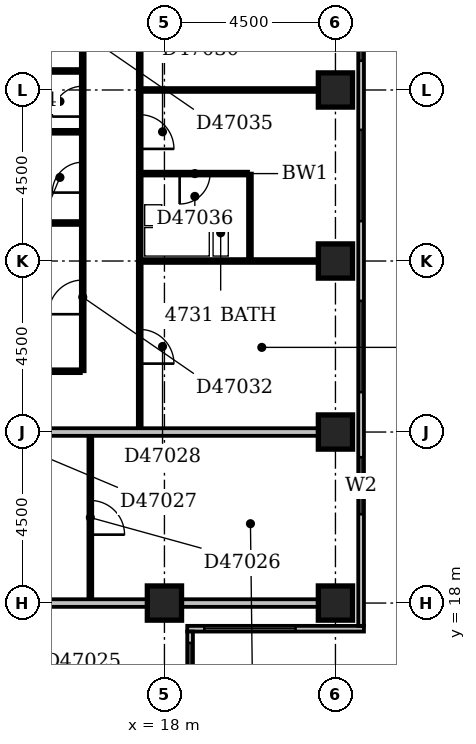
"""IFC4 building model, lengths in metres.
Left out: names, types, materials, properties, quantities, classifications, styles, units other than length and angle.
Written with IfcOpenShell. Run it as: python <this file> out.ifc"""

import sys

from ifc_helpers import new_model, si_unit, direction, frame, frame_2d, origin, origin_2d, place, context, subcontext, project, spatial, rectangle, extrude, element, fill, save


model = new_model("IFC4")
c1 = context("Model", 3, precision=1e-05, world=origin(), true_north=direction((0.0, 1.0)))
c2 = subcontext(c1, "Body", "Model", "MODEL_VIEW")
j1 = project(units=[si_unit("LENGTHUNIT", "METRE"), si_unit("PLANEANGLEUNIT", "RADIAN")], contexts=[c1])
p1 = place(None, origin())
s1 = spatial("IfcSite", under=j1, at=p1, CompositionType="ELEMENT")
p2 = place(p1, origin())
s2 = spatial("IfcBuilding", under=s1, at=p2, CompositionType="ELEMENT")
p3 = place(p2, frame((0.0, 0.0, 186.2)))
s3 = spatial("IfcBuildingStorey", under=s2, at=p3, CompositionType="ELEMENT", Elevation=186.2)
for number, where, z_axis, x_axis in (
    (1, (18.0, 18.0, -0.35), (0.0, 0.0, 1.0), (1.0, 0.0, 0.0)),
    (2, (22.5, 18.0, -0.35), (0.0, 0.0, 1.0), (1.0, 0.0, 0.0)),
    (3, (22.5, 22.5, -0.35), (0.0, 0.0, 1.0), (1.0, 0.0, 0.0)),
    (4, (22.5, 27.0, -0.35), (0.0, 0.0, 1.0), (1.0, 0.0, 0.0)),
    (5, (22.5, 31.5, -0.35), (0.0, 0.0, 1.0), (1.0, 0.0, 0.0)),
):
    element("IfcColumn", number, at=place(p3, frame(where, z_axis=z_axis, x_axis=x_axis)), inside=s3, PredefinedType="COLUMN", context=c2, shape_type="SweptSolid", body=[
        extrude(rectangle(XDim=0.9, YDim=0.9, at=origin_2d()), origin(), (0.0, 0.0, 1.0), 3.65),
    ])
p4 = place(p3, frame((18.675, 8.4, 0.0), z_axis=(0.0, 0.0, 1.0), x_axis=(0.0, 1.0, 0.0)))
e6 = element("IfcWall", 6, at=p4, inside=s3, PredefinedType="STANDARD", context=c2, shape_type="SweptSolid", body=[
    extrude(rectangle(XDim=8.85, YDim=0.15, at=frame_2d((4.425, 0.0))), origin(), (0.0, 0.0, 1.0), 2.7),
])
p5 = place(p4, frame((1.935, 0.0, 0.6)))
e7 = element("IfcOpeningElement", 7, at=p5, cuts=e6, PredefinedType="OPENING", context=c2, shape_type="SweptSolid", body=[
    extrude(rectangle(XDim=2.4, YDim=1.8, at=frame_2d((1.2, 0.9))), frame((0.0, 0.087, 0.0), z_axis=(0.0, -1.0, 0.0), x_axis=(1.0, 0.0, 0.0)), (0.0, 0.0, 1.0), 0.174),
])
p6 = place(p4, frame((6.15, 0.0, 0.6)))
e8 = element("IfcOpeningElement", 8, at=p6, cuts=e6, PredefinedType="OPENING", context=c2, shape_type="SweptSolid", body=[
    extrude(rectangle(XDim=2.4, YDim=1.8, at=frame_2d((1.2, 0.9))), frame((0.0, 0.087, 0.0), z_axis=(0.0, -1.0, 0.0), x_axis=(1.0, 0.0, 0.0)), (0.0, 0.0, 1.0), 0.174),
])
p7 = place(p3, frame((18.6, 17.325, 0.0), z_axis=(0.0, 0.0, 1.0), x_axis=(1.0, 0.0, 0.0)))
e9 = element("IfcWall", 9, at=p7, inside=s3, PredefinedType="STANDARD", context=c2, shape_type="SweptSolid", body=[
    extrude(rectangle(XDim=4.65, YDim=0.15, at=frame_2d((2.325, 0.0))), origin(), (0.0, 0.0, 1.0), 2.7),
])
p8 = place(p7, frame((0.45, 0.0, 0.6)))
e10 = element("IfcOpeningElement", 10, at=p8, cuts=e9, PredefinedType="OPENING", context=c2, shape_type="SweptSolid", body=[
    extrude(rectangle(XDim=2.4, YDim=1.8, at=frame_2d((1.2, 0.9))), frame((0.0, 0.087, 0.0), z_axis=(0.0, -1.0, 0.0), x_axis=(1.0, 0.0, 0.0)), (0.0, 0.0, 1.0), 0.174),
])
p9 = place(p3, frame((23.175, 17.4, 0.0), z_axis=(0.0, 0.0, 1.0), x_axis=(0.0, 1.0, 0.0)))
e11 = element("IfcWall", 11, at=p9, inside=s3, PredefinedType="STANDARD", context=c2, shape_type="SweptSolid", body=[
    extrude(rectangle(XDim=17.85, YDim=0.15, at=frame_2d((8.925, 0.0))), origin(), (0.0, 0.0, 1.0), 2.7),
])
p10 = place(p9, frame((2.937, 0.0, 0.6)))
e12 = element("IfcOpeningElement", 12, at=p10, cuts=e11, PredefinedType="OPENING", context=c2, shape_type="SweptSolid", body=[
    extrude(rectangle(XDim=1.5, YDim=1.8, at=frame_2d((0.75, 0.9))), frame((0.0, 0.087, 0.0), z_axis=(0.0, -1.0, 0.0), x_axis=(1.0, 0.0, 0.0)), (0.0, 0.0, 1.0), 0.174),
])
p11 = place(p9, frame((6.15, 0.0, 0.6)))
e13 = element("IfcOpeningElement", 13, at=p11, cuts=e11, PredefinedType="OPENING", context=c2, shape_type="SweptSolid", body=[
    extrude(rectangle(XDim=2.4, YDim=1.8, at=frame_2d((1.2, 0.9))), frame((0.0, 0.087, 0.0), z_axis=(0.0, -1.0, 0.0), x_axis=(1.0, 0.0, 0.0)), (0.0, 0.0, 1.0), 0.174),
])
p12 = place(p9, frame((10.65, 0.0, 0.6)))
e14 = element("IfcOpeningElement", 14, at=p12, cuts=e11, PredefinedType="OPENING", context=c2, shape_type="SweptSolid", body=[
    extrude(rectangle(XDim=2.4, YDim=1.8, at=frame_2d((1.2, 0.9))), frame((0.0, 0.087, 0.0), z_axis=(0.0, -1.0, 0.0), x_axis=(1.0, 0.0, 0.0)), (0.0, 0.0, 1.0), 0.174),
])
p13 = place(p9, frame((14.869, 0.0, 0.6)))
e15 = element("IfcOpeningElement", 15, at=p13, cuts=e11, PredefinedType="OPENING", context=c2, shape_type="SweptSolid", body=[
    extrude(rectangle(XDim=2.4, YDim=1.8, at=frame_2d((1.2, 0.9))), frame((0.0, 0.087, 0.0), z_axis=(0.0, -1.0, 0.0), x_axis=(1.0, 0.0, 0.0)), (0.0, 0.0, 1.0), 0.174),
])
p14 = place(p3, frame((9.1, 18.0, 0.0), z_axis=(0.0, 0.0, 1.0), x_axis=(1.0, 0.0, 0.0)))
e16 = element("IfcWall", 16, at=p14, inside=s3, PredefinedType="PARTITIONING", context=c2, shape_type="SweptSolid", body=[
    extrude(rectangle(XDim=8.45, YDim=0.2, at=frame_2d((4.225, 0.0))), origin(), (0.0, 0.0, 1.0), 2.6),
])
p15 = place(p3, frame((18.45, 18.0, 0.0), z_axis=(0.0, 0.0, 1.0), x_axis=(1.0, 0.0, 0.0)))
e17 = element("IfcWall", 17, at=p15, inside=s3, PredefinedType="PARTITIONING", context=c2, shape_type="SweptSolid", body=[
    extrude(rectangle(XDim=3.6, YDim=0.2, at=frame_2d((1.8, 0.0))), origin(), (0.0, 0.0, 1.0), 2.7),
])
p16 = place(p3, frame((16.05, 18.1, 0.0), z_axis=(0.0, 0.0, 1.0), x_axis=(0.0, 1.0, 0.0)))
e18 = element("IfcWall", 18, at=p16, inside=s3, PredefinedType="PARTITIONING", context=c2, shape_type="SweptSolid", body=[
    extrude(rectangle(XDim=4.3, YDim=0.1, at=frame_2d((2.15, 0.0))), origin(), (0.0, 0.0, 1.0), 3.3),
])
p17 = place(p16, frame((1.7, 0.0, 0.0)))
e19 = element("IfcOpeningElement", 19, at=p17, cuts=e18, PredefinedType="OPENING", context=c2, shape_type="SweptSolid", body=[
    extrude(rectangle(XDim=0.9, YDim=2.1, at=frame_2d((0.45, 1.05))), frame((0.0, 0.062, 0.0), z_axis=(0.0, -1.0, 0.0), x_axis=(1.0, 0.0, 0.0)), (0.0, 0.0, 1.0), 0.124),
])
p18 = place(p3, frame((9.1, 22.5, 0.0), z_axis=(0.0, 0.0, 1.0), x_axis=(1.0, 0.0, 0.0)))
e20 = element("IfcWall", 20, at=p18, inside=s3, PredefinedType="PARTITIONING", context=c2, shape_type="SweptSolid", body=[
    extrude(rectangle(XDim=12.95, YDim=0.2, at=frame_2d((6.475, 0.0))), origin(), (0.0, 0.0, 1.0), 3.3),
])
p19 = place(p3, frame((17.35, 22.6, 0.0), z_axis=(0.0, 0.0, 1.0), x_axis=(0.0, 1.0, 0.0)))
e21 = element("IfcWall", 21, at=p19, inside=s3, PredefinedType="PARTITIONING", context=c2, shape_type="SweptSolid", body=[
    extrude(rectangle(XDim=13.3, YDim=0.1, at=frame_2d((6.65, 0.0))), origin(), (0.0, 0.0, 1.0), 3.3),
])
p20 = place(p19, frame((1.7, 0.0, 0.0)))
e22 = element("IfcOpeningElement", 22, at=p20, cuts=e21, PredefinedType="OPENING", context=c2, shape_type="SweptSolid", body=[
    extrude(rectangle(XDim=0.9, YDim=2.1, at=frame_2d((0.45, 1.05))), frame((0.0, 0.062, 0.0), z_axis=(0.0, -1.0, 0.0), x_axis=(1.0, 0.0, 0.0)), (0.0, 0.0, 1.0), 0.124),
])
p21 = place(p19, frame((7.35, 0.0, 0.0)))
e23 = element("IfcOpeningElement", 23, at=p21, cuts=e21, PredefinedType="OPENING", context=c2, shape_type="SweptSolid", body=[
    extrude(rectangle(XDim=0.9, YDim=2.1, at=frame_2d((0.45, 1.05))), frame((0.0, 0.062, 0.0), z_axis=(0.0, -1.0, 0.0), x_axis=(1.0, 0.0, 0.0)), (0.0, 0.0, 1.0), 0.124),
])
p22 = place(p19, frame((10.7, 0.0, 0.0)))
e24 = element("IfcOpeningElement", 24, at=p22, cuts=e21, PredefinedType="OPENING", context=c2, shape_type="SweptSolid", body=[
    extrude(rectangle(XDim=0.9, YDim=2.1, at=frame_2d((0.45, 1.05))), frame((0.0, 0.062, 0.0), z_axis=(0.0, -1.0, 0.0), x_axis=(1.0, 0.0, 0.0)), (0.0, 0.0, 1.0), 0.124),
])
p23 = place(p3, frame((9.1, 24.1, 0.0), z_axis=(0.0, 0.0, 1.0), x_axis=(1.0, 0.0, 0.0)))
e25 = element("IfcWall", 25, at=p23, inside=s3, PredefinedType="PARTITIONING", context=c2, shape_type="SweptSolid", body=[
    extrude(rectangle(XDim=6.7, YDim=0.1, at=frame_2d((3.35, 0.0))), origin(), (0.0, 0.0, 1.0), 3.3),
])
p24 = place(p3, frame((15.85, 24.1, 0.0), z_axis=(0.0, 0.0, 1.0), x_axis=(0.0, 1.0, 0.0)))
e26 = element("IfcWall", 26, at=p24, inside=s3, PredefinedType="PARTITIONING", context=c2, shape_type="SweptSolid", body=[
    extrude(rectangle(XDim=11.8, YDim=0.1, at=frame_2d((5.9, 0.0))), origin(), (0.0, 0.0, 1.0), 3.3),
])
p25 = place(p24, frame((4.7, 0.0, 0.0)))
e27 = element("IfcOpeningElement", 27, at=p25, cuts=e26, PredefinedType="OPENING", context=c2, shape_type="SweptSolid", body=[
    extrude(rectangle(XDim=0.8, YDim=2.1, at=frame_2d((0.4, 1.05))), frame((0.0, 0.062, 0.0), z_axis=(0.0, -1.0, 0.0), x_axis=(1.0, 0.0, 0.0)), (0.0, 0.0, 1.0), 0.124),
])
p26 = place(p24, frame((1.5, 0.0, 0.0)))
e28 = element("IfcOpeningElement", 28, at=p26, cuts=e26, PredefinedType="OPENING", context=c2, shape_type="SweptSolid", body=[
    extrude(rectangle(XDim=0.9, YDim=2.1, at=frame_2d((0.45, 1.05))), frame((0.0, 0.062, 0.0), z_axis=(0.0, -1.0, 0.0), x_axis=(1.0, 0.0, 0.0)), (0.0, 0.0, 1.0), 0.124),
])
p27 = place(p24, frame((10.5, 0.0, 0.0)))
e29 = element("IfcOpeningElement", 29, at=p27, cuts=e26, PredefinedType="OPENING", context=c2, shape_type="SweptSolid", body=[
    extrude(rectangle(XDim=0.8, YDim=2.1, at=frame_2d((0.4, 1.05))), frame((0.0, 0.062, 0.0), z_axis=(0.0, -1.0, 0.0), x_axis=(1.0, 0.0, 0.0)), (0.0, 0.0, 1.0), 0.124),
])
p28 = place(p24, frame((6.7, 0.0, 0.0)))
e30 = element("IfcOpeningElement", 30, at=p28, cuts=e26, PredefinedType="OPENING", context=c2, shape_type="SweptSolid", body=[
    extrude(rectangle(XDim=0.8, YDim=2.1, at=frame_2d((0.4, 1.05))), frame((0.0, 0.062, 0.0), z_axis=(0.0, -1.0, 0.0), x_axis=(1.0, 0.0, 0.0)), (0.0, 0.0, 1.0), 0.124),
])
p29 = place(p24, frame((8.5, 0.0, 0.0)))
e31 = element("IfcOpeningElement", 31, at=p29, cuts=e26, PredefinedType="OPENING", context=c2, shape_type="SweptSolid", body=[
    extrude(rectangle(XDim=0.8, YDim=2.1, at=frame_2d((0.4, 1.05))), frame((0.0, 0.062, 0.0), z_axis=(0.0, -1.0, 0.0), x_axis=(1.0, 0.0, 0.0)), (0.0, 0.0, 1.0), 0.124),
])
p30 = place(p3, frame((17.4, 27.0, 0.0), z_axis=(0.0, 0.0, 1.0), x_axis=(1.0, 0.0, 0.0)))
e32 = element("IfcWall", 32, at=p30, inside=s3, PredefinedType="PARTITIONING", context=c2, shape_type="SweptSolid", body=[
    extrude(rectangle(XDim=4.65, YDim=0.1, at=frame_2d((2.325, 0.0))), origin(), (0.0, 0.0, 1.0), 2.7),
])
p31 = place(p3, frame((20.25, 27.05, 0.0), z_axis=(0.0, 0.0, 1.0), x_axis=(0.0, 1.0, 0.0)))
e33 = element("IfcWall", 33, at=p31, inside=s3, PredefinedType="PLUMBINGWALL", context=c2, shape_type="SweptSolid", body=[
    extrude(rectangle(XDim=2.25, YDim=0.1, at=frame_2d((1.125, 0.0))), origin(), (0.0, 0.0, 1.0), 3.3),
])
p32 = place(p3, frame((9.1, 28.0, 0.0), z_axis=(0.0, 0.0, 1.0), x_axis=(1.0, 0.0, 0.0)))
e34 = element("IfcWall", 34, at=p32, inside=s3, PredefinedType="PLUMBINGWALL", context=c2, shape_type="SweptSolid", body=[
    extrude(rectangle(XDim=6.7, YDim=0.1, at=frame_2d((3.35, 0.0))), origin(), (0.0, 0.0, 1.0), 3.3),
])
p33 = place(p3, frame((17.4, 29.3, 0.0), z_axis=(0.0, 0.0, 1.0), x_axis=(1.0, 0.0, 0.0)))
e35 = element("IfcWall", 35, at=p33, inside=s3, PredefinedType="PLUMBINGWALL", context=c2, shape_type="SweptSolid", body=[
    extrude(rectangle(XDim=2.8, YDim=0.1, at=frame_2d((1.4, 0.0))), origin(), (0.0, 0.0, 1.0), 3.3),
])
p34 = place(p33, frame((1.0, 0.0, 0.0)))
e36 = element("IfcOpeningElement", 36, at=p34, cuts=e35, PredefinedType="OPENING", context=c2, shape_type="SweptSolid", body=[
    extrude(rectangle(XDim=0.8, YDim=2.1, at=frame_2d((0.4, 1.05))), frame((0.0, 0.062, 0.0), z_axis=(0.0, -1.0, 0.0), x_axis=(1.0, 0.0, 0.0)), (0.0, 0.0, 1.0), 0.124),
])
p35 = place(p3, frame((9.1, 30.4, 0.0), z_axis=(0.0, 0.0, 1.0), x_axis=(1.0, 0.0, 0.0)))
e37 = element("IfcWall", 37, at=p35, inside=s3, PredefinedType="PLUMBINGWALL", context=c2, shape_type="SweptSolid", body=[
    extrude(rectangle(XDim=6.7, YDim=0.1, at=frame_2d((3.35, 0.0))), origin(), (0.0, 0.0, 1.0), 3.3),
])
p36 = place(p3, frame((17.4, 31.5, 0.0), z_axis=(0.0, 0.0, 1.0), x_axis=(1.0, 0.0, 0.0)))
e38 = element("IfcWall", 38, at=p36, inside=s3, PredefinedType="PARTITIONING", context=c2, shape_type="SweptSolid", body=[
    extrude(rectangle(XDim=4.65, YDim=0.1, at=frame_2d((2.325, 0.0))), origin(), (0.0, 0.0, 1.0), 3.3),
])
p37 = place(p3, frame((9.1, 32.0, 0.0), z_axis=(0.0, 0.0, 1.0), x_axis=(1.0, 0.0, 0.0)))
e39 = element("IfcWall", 39, at=p37, inside=s3, PredefinedType="PARTITIONING", context=c2, shape_type="SweptSolid", body=[
    extrude(rectangle(XDim=6.7, YDim=0.1, at=frame_2d((3.35, 0.0))), origin(), (0.0, 0.0, 1.0), 3.3),
])
p38 = place(p6, origin())
e40 = element("IfcWindow", 40, at=p38, inside=s3, PartitioningType="SINGLE_PANEL", PredefinedType="WINDOW", context=c2, shape_type="SweptSolid", body=[
    extrude(rectangle(XDim=2.4, YDim=1.8, at=frame_2d((1.2, 0.9))), frame((0.0, 0.03, 0.0), z_axis=(0.0, -1.0, 0.0), x_axis=(1.0, 0.0, 0.0)), (0.0, 0.0, 1.0), 0.06),
])
fill(e8, e40)
p39 = place(p8, origin())
e41 = element("IfcWindow", 41, at=p39, inside=s3, PartitioningType="SINGLE_PANEL", PredefinedType="WINDOW", context=c2, shape_type="SweptSolid", body=[
    extrude(rectangle(XDim=2.4, YDim=1.8, at=frame_2d((1.2, 0.9))), frame((0.0, 0.03, 0.0), z_axis=(0.0, -1.0, 0.0), x_axis=(1.0, 0.0, 0.0)), (0.0, 0.0, 1.0), 0.06),
])
fill(e10, e41)
p40 = place(p10, origin())
e42 = element("IfcWindow", 42, at=p40, inside=s3, PartitioningType="SINGLE_PANEL", PredefinedType="WINDOW", context=c2, shape_type="SweptSolid", body=[
    extrude(rectangle(XDim=1.5, YDim=1.8, at=frame_2d((0.75, 0.9))), frame((0.0, 0.03, 0.0), z_axis=(0.0, -1.0, 0.0), x_axis=(1.0, 0.0, 0.0)), (0.0, 0.0, 1.0), 0.06),
])
fill(e12, e42)
p41 = place(p11, origin())
e43 = element("IfcWindow", 43, at=p41, inside=s3, PartitioningType="SINGLE_PANEL", PredefinedType="WINDOW", context=c2, shape_type="SweptSolid", body=[
    extrude(rectangle(XDim=2.4, YDim=1.8, at=frame_2d((1.2, 0.9))), frame((0.0, 0.03, 0.0), z_axis=(0.0, -1.0, 0.0), x_axis=(1.0, 0.0, 0.0)), (0.0, 0.0, 1.0), 0.06),
])
fill(e13, e43)
p42 = place(p12, origin())
e44 = element("IfcWindow", 44, at=p42, inside=s3, PartitioningType="SINGLE_PANEL", PredefinedType="WINDOW", context=c2, shape_type="SweptSolid", body=[
    extrude(rectangle(XDim=2.4, YDim=1.8, at=frame_2d((1.2, 0.9))), frame((0.0, 0.03, 0.0), z_axis=(0.0, -1.0, 0.0), x_axis=(1.0, 0.0, 0.0)), (0.0, 0.0, 1.0), 0.06),
])
fill(e14, e44)
p43 = place(p13, origin())
e45 = element("IfcWindow", 45, at=p43, inside=s3, PartitioningType="SINGLE_PANEL", PredefinedType="WINDOW", context=c2, shape_type="SweptSolid", body=[
    extrude(rectangle(XDim=2.4, YDim=1.8, at=frame_2d((1.2, 0.9))), frame((0.0, 0.03, 0.0), z_axis=(0.0, -1.0, 0.0), x_axis=(1.0, 0.0, 0.0)), (0.0, 0.0, 1.0), 0.06),
])
fill(e15, e45)
p44 = place(p17, frame((0.9, 0.0, 0.0), z_axis=(0.0, 0.0, 1.0), x_axis=(-1.0, 0.0, 0.0)))
e46 = element("IfcDoor", 46, at=p44, inside=s3, OperationType="SINGLE_SWING_RIGHT", PredefinedType="DOOR", context=c2, shape_type="SweptSolid", body=[
    extrude(rectangle(XDim=0.9, YDim=2.1, at=frame_2d((0.45, 1.05))), frame((0.0, 0.025, 0.0), z_axis=(0.0, -1.0, 0.0), x_axis=(1.0, 0.0, 0.0)), (0.0, 0.0, 1.0), 0.05),
])
fill(e19, e46)
p45 = place(p20, frame((0.9, 0.0, 0.0), z_axis=(0.0, 0.0, 1.0), x_axis=(-1.0, 0.0, 0.0)))
e47 = element("IfcDoor", 47, at=p45, inside=s3, OperationType="SINGLE_SWING_RIGHT", PredefinedType="DOOR", context=c2, shape_type="SweptSolid", body=[
    extrude(rectangle(XDim=0.9, YDim=2.1, at=frame_2d((0.45, 1.05))), frame((0.0, 0.025, 0.0), z_axis=(0.0, -1.0, 0.0), x_axis=(1.0, 0.0, 0.0)), (0.0, 0.0, 1.0), 0.05),
])
fill(e22, e47)
p46 = place(p21, frame((0.9, 0.0, 0.0), z_axis=(0.0, 0.0, 1.0), x_axis=(-1.0, 0.0, 0.0)))
e48 = element("IfcDoor", 48, at=p46, inside=s3, OperationType="SINGLE_SWING_RIGHT", PredefinedType="DOOR", context=c2, shape_type="SweptSolid", body=[
    extrude(rectangle(XDim=0.9, YDim=2.1, at=frame_2d((0.45, 1.05))), frame((0.0, 0.025, 0.0), z_axis=(0.0, -1.0, 0.0), x_axis=(1.0, 0.0, 0.0)), (0.0, 0.0, 1.0), 0.05),
])
fill(e23, e48)
p47 = place(p25, origin())
e49 = element("IfcDoor", 49, at=p47, inside=s3, OperationType="SINGLE_SWING_LEFT", PredefinedType="DOOR", context=c2, shape_type="SweptSolid", body=[
    extrude(rectangle(XDim=0.8, YDim=2.1, at=frame_2d((0.4, 1.05))), frame((0.0, 0.025, 0.0), z_axis=(0.0, -1.0, 0.0), x_axis=(1.0, 0.0, 0.0)), (0.0, 0.0, 1.0), 0.05),
])
fill(e27, e49)
p48 = place(p26, origin())
e50 = element("IfcDoor", 50, at=p48, inside=s3, OperationType="SINGLE_SWING_LEFT", PredefinedType="DOOR", context=c2, shape_type="SweptSolid", body=[
    extrude(rectangle(XDim=0.9, YDim=2.1, at=frame_2d((0.45, 1.05))), frame((0.0, 0.025, 0.0), z_axis=(0.0, -1.0, 0.0), x_axis=(1.0, 0.0, 0.0)), (0.0, 0.0, 1.0), 0.05),
])
fill(e28, e50)
p49 = place(p28, origin())
e51 = element("IfcDoor", 51, at=p49, inside=s3, OperationType="SINGLE_SWING_LEFT", PredefinedType="DOOR", context=c2, shape_type="SweptSolid", body=[
    extrude(rectangle(XDim=0.8, YDim=2.1, at=frame_2d((0.4, 1.05))), frame((0.0, 0.025, 0.0), z_axis=(0.0, -1.0, 0.0), x_axis=(1.0, 0.0, 0.0)), (0.0, 0.0, 1.0), 0.05),
])
fill(e30, e51)
p50 = place(p34, frame((0.8, 0.0, 0.0), z_axis=(0.0, 0.0, 1.0), x_axis=(-1.0, 0.0, 0.0)))
e52 = element("IfcDoor", 52, at=p50, inside=s3, OperationType="SINGLE_SWING_RIGHT", PredefinedType="DOOR", context=c2, shape_type="SweptSolid", body=[
    extrude(rectangle(XDim=0.8, YDim=2.1, at=frame_2d((0.4, 1.05))), frame((0.0, 0.025, 0.0), z_axis=(0.0, -1.0, 0.0), x_axis=(1.0, 0.0, 0.0)), (0.0, 0.0, 1.0), 0.05),
])
fill(e36, e52)
save(model, sys.argv[1])
